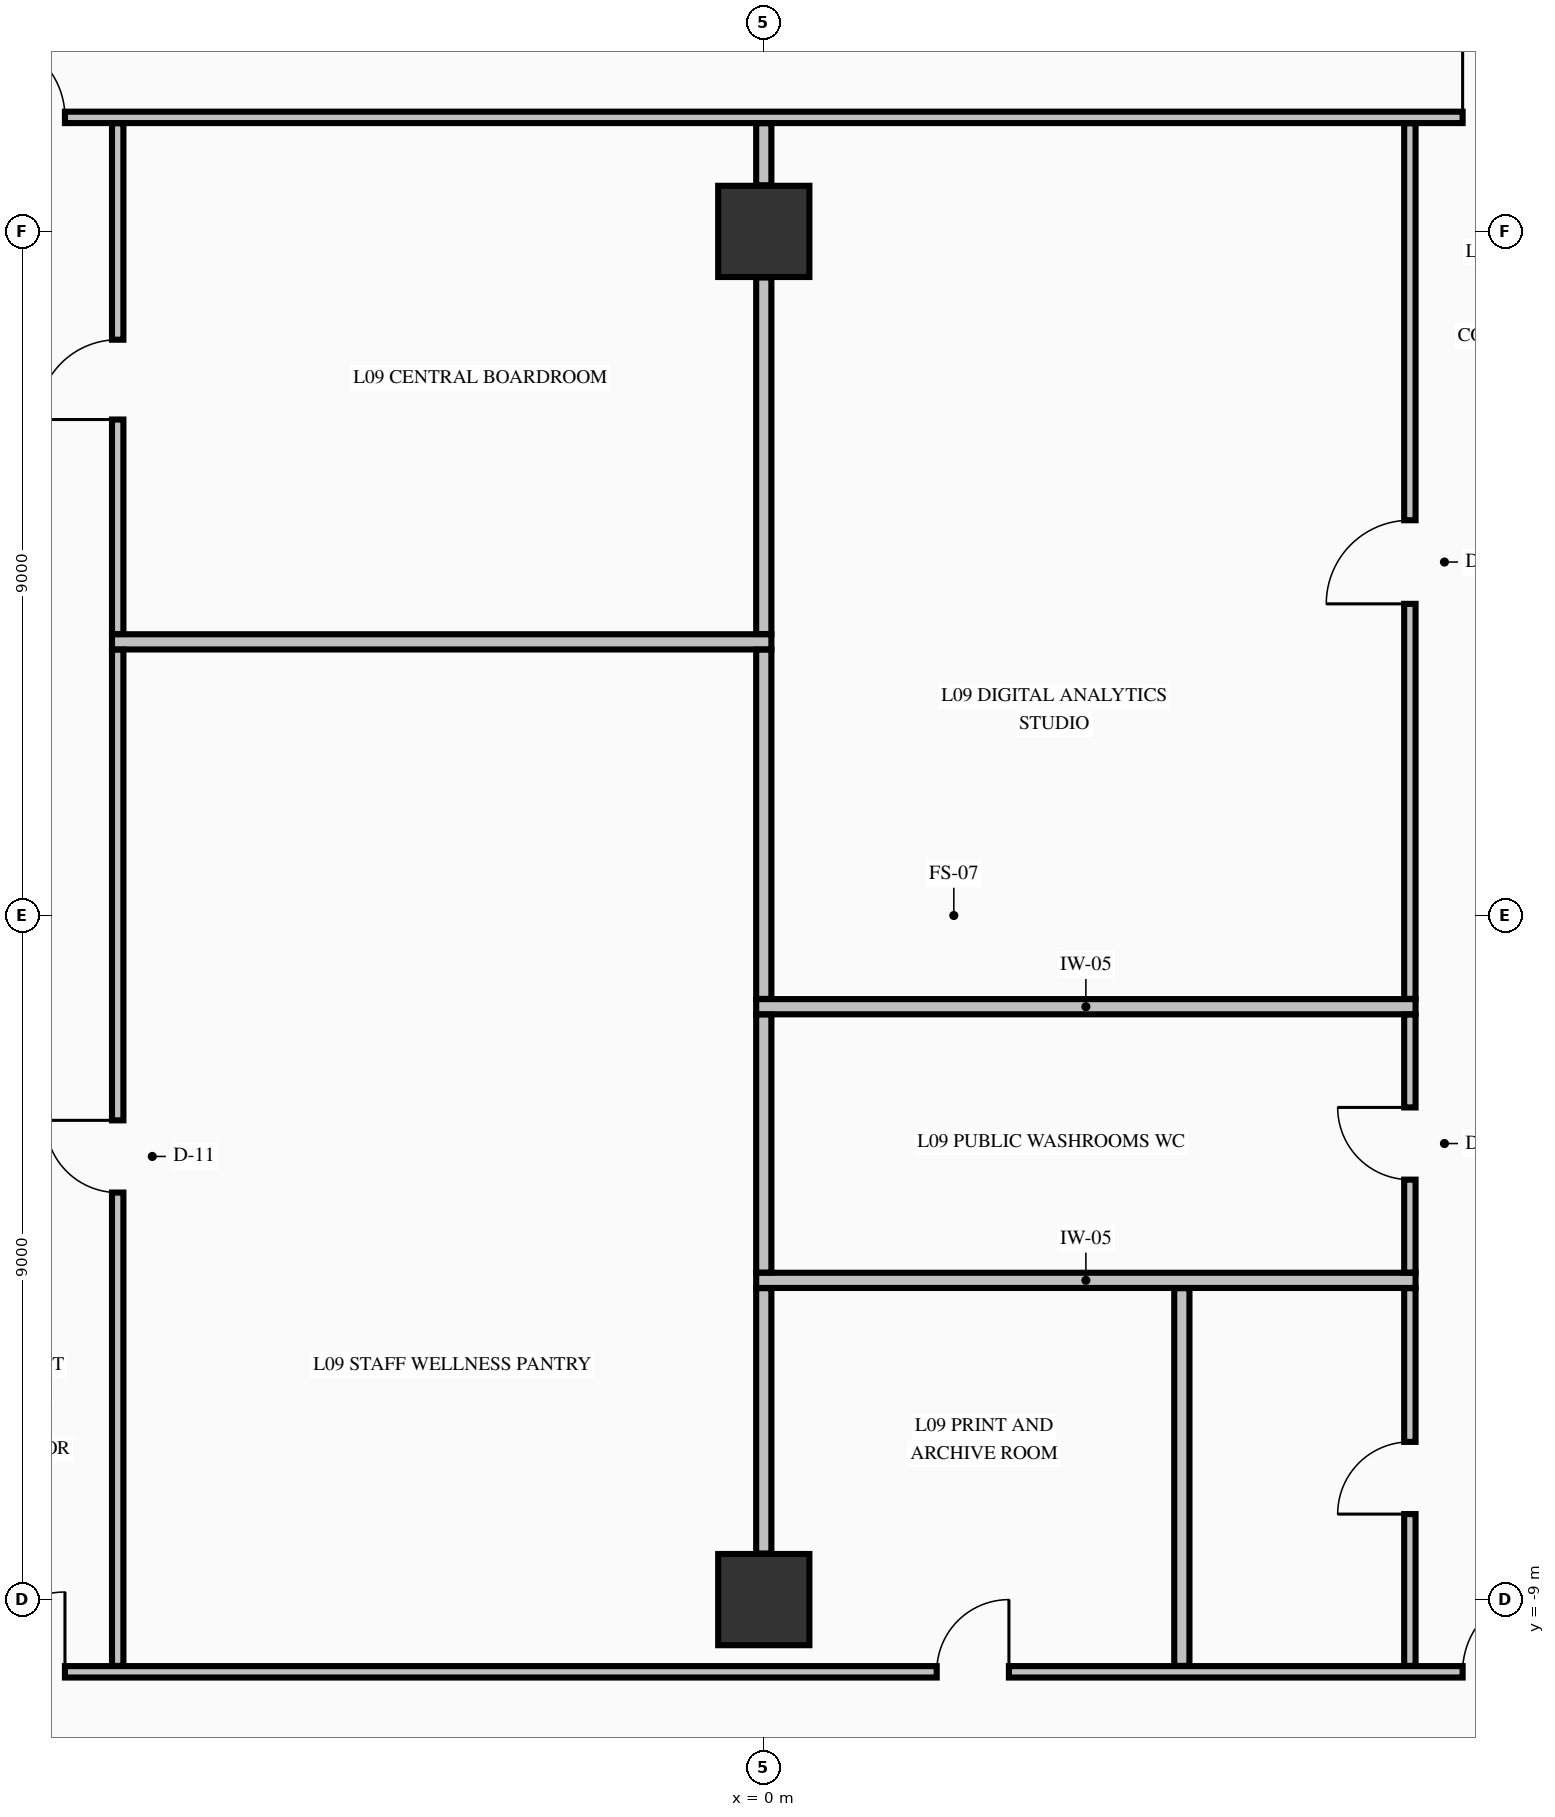
"""IFC4 building model, lengths in metres.
Left out: names, types, materials, properties, quantities, classifications, styles, units other than length and angle.
Written with IfcOpenShell. Run it as: python <this file> out.ifc"""

import sys

from ifc_helpers import new_model, si_unit, direction, frame, frame_2d, origin, origin_2d, place, context, subcontext, project, spatial, rectangle, extrude, element, fill, save


model = new_model("IFC4")
c1 = context("Model", 3, precision=1e-05, world=origin(), true_north=direction((0.0, 1.0)))
c2 = subcontext(c1, "Body", "Model", "MODEL_VIEW")
j1 = project(units=[si_unit("LENGTHUNIT", "METRE"), si_unit("PLANEANGLEUNIT", "RADIAN")], contexts=[c1])
p1 = place(None, origin())
s1 = spatial("IfcSite", under=j1, at=p1, CompositionType="ELEMENT")
p2 = place(p1, origin())
s2 = spatial("IfcBuilding", under=s1, at=p2, CompositionType="ELEMENT")
p3 = place(p2, frame((0.0, 0.0, 41.48)))
s3 = spatial("IfcBuildingStorey", under=s2, at=p3, CompositionType="ELEMENT", Elevation=41.48)
for number, where, z_axis, x_axis in (
    (1, (0.0, -9.0, -0.25), (0.0, 0.0, 1.0), (1.0, 0.0, 0.0)),
    (2, (0.0, 9.0, -0.25), (0.0, 0.0, 1.0), (1.0, 0.0, 0.0)),
):
    element("IfcColumn", number, at=place(p3, frame(where, z_axis=z_axis, x_axis=x_axis)), inside=s3, PredefinedType="COLUMN", context=c2, shape_type="SweptSolid", body=[
        extrude(rectangle(XDim=1.2, YDim=1.2, at=origin_2d()), origin(), (0.0, 0.0, 1.0), 3.57),
    ])
p4 = place(p3, frame((-10.394, -9.95, 0.0), z_axis=(0.0, 0.0, 1.0), x_axis=(1.0, 0.0, 0.0)))
e3 = element("IfcWall", 3, at=p4, inside=s3, PredefinedType="PARTITIONING", context=c2, shape_type="SweptSolid", body=[
    extrude(rectangle(XDim=20.788, YDim=0.15, at=frame_2d((10.394, 0.0))), origin(), (0.0, 0.0, 1.0), 3.32),
])
p5 = place(p4, frame((0.15, 0.0, 0.0)))
e4 = element("IfcOpeningElement", 4, at=p5, cuts=e3, PredefinedType="OPENING", context=c2, shape_type="SweptSolid", body=[
    extrude(rectangle(XDim=1.05, YDim=2.15, at=frame_2d((0.525, 1.075))), frame((0.0, 0.085, 0.0), z_axis=(0.0, -1.0, 0.0), x_axis=(1.0, 0.0, 0.0)), (0.0, 0.0, 1.0), 0.17),
])
p6 = place(p4, frame((19.588, 0.0, 0.0)))
e5 = element("IfcOpeningElement", 5, at=p6, cuts=e3, PredefinedType="OPENING", context=c2, shape_type="SweptSolid", body=[
    extrude(rectangle(XDim=1.05, YDim=2.15, at=frame_2d((0.525, 1.075))), frame((0.0, 0.085, 0.0), z_axis=(0.0, -1.0, 0.0), x_axis=(1.0, 0.0, 0.0)), (0.0, 0.0, 1.0), 0.17),
])
p7 = place(p4, frame((12.669, 0.0, 0.0)))
e6 = element("IfcOpeningElement", 6, at=p7, cuts=e3, PredefinedType="OPENING", context=c2, shape_type="SweptSolid", body=[
    extrude(rectangle(XDim=0.95, YDim=2.15, at=frame_2d((0.475, 1.075))), frame((0.0, 0.085, 0.0), z_axis=(0.0, -1.0, 0.0), x_axis=(1.0, 0.0, 0.0)), (0.0, 0.0, 1.0), 0.17),
])
for number, where, z_axis, x_axis in (
    (7, (-0.1, -4.8, 0.0), (0.0, 0.0, 1.0), (1.0, 0.0, 0.0)),
    (8, (-0.1, -1.2, 0.0), (0.0, 0.0, 1.0), (1.0, 0.0, 0.0)),
    (9, (-8.575, 3.6, 0.0), (0.0, 0.0, 1.0), (1.0, 0.0, 0.0)),
):
    element("IfcWall", number, at=place(p3, frame(where, z_axis=z_axis, x_axis=x_axis)), inside=s3, PredefinedType="PARTITIONING", context=c2, shape_type="SweptSolid", body=[
        extrude(rectangle(XDim=8.675, YDim=0.2, at=frame_2d((4.337, 0.0))), origin(), (0.0, 0.0, 1.0), 3.32),
    ])
p8 = place(p3, frame((-10.394, 10.5, 0.0), z_axis=(0.0, 0.0, 1.0), x_axis=(1.0, 0.0, 0.0)))
e10 = element("IfcWall", 10, at=p8, inside=s3, PredefinedType="PARTITIONING", context=c2, shape_type="SweptSolid", body=[
    extrude(rectangle(XDim=20.788, YDim=0.15, at=frame_2d((10.394, 0.0))), origin(), (0.0, 0.0, 1.0), 3.32),
])
p9 = place(p8, frame((0.15, 0.0, 0.0)))
e11 = element("IfcOpeningElement", 11, at=p9, cuts=e10, PredefinedType="OPENING", context=c2, shape_type="SweptSolid", body=[
    extrude(rectangle(XDim=1.05, YDim=2.15, at=frame_2d((0.525, 1.075))), frame((0.0, 0.085, 0.0), z_axis=(0.0, -1.0, 0.0), x_axis=(1.0, 0.0, 0.0)), (0.0, 0.0, 1.0), 0.17),
])
p10 = place(p8, frame((19.588, 0.0, 0.0)))
e12 = element("IfcOpeningElement", 12, at=p10, cuts=e10, PredefinedType="OPENING", context=c2, shape_type="SweptSolid", body=[
    extrude(rectangle(XDim=1.05, YDim=2.15, at=frame_2d((0.525, 1.075))), frame((0.0, 0.085, 0.0), z_axis=(0.0, -1.0, 0.0), x_axis=(1.0, 0.0, 0.0)), (0.0, 0.0, 1.0), 0.17),
])
p11 = place(p3, frame((-8.5, -9.872, 0.0), z_axis=(0.0, 0.0, 1.0), x_axis=(0.0, 1.0, 0.0)))
e13 = element("IfcWall", 13, at=p11, inside=s3, PredefinedType="PARTITIONING", context=c2, shape_type="SweptSolid", body=[
    extrude(rectangle(XDim=13.369, YDim=0.15, at=frame_2d((6.685, 0.0))), origin(), (0.0, 0.0, 1.0), 3.32),
])
p12 = place(p11, frame((6.227, 0.0, 0.0)))
e14 = element("IfcOpeningElement", 14, at=p12, cuts=e13, PredefinedType="OPENING", context=c2, shape_type="SweptSolid", body=[
    extrude(rectangle(XDim=0.95, YDim=2.15, at=frame_2d((0.475, 1.075))), frame((0.0, 0.085, 0.0), z_axis=(0.0, -1.0, 0.0), x_axis=(1.0, 0.0, 0.0)), (0.0, 0.0, 1.0), 0.17),
])
p13 = place(p3, frame((-8.5, 3.703, 0.0), z_axis=(0.0, 0.0, 1.0), x_axis=(0.0, 1.0, 0.0)))
e15 = element("IfcWall", 15, at=p13, inside=s3, PredefinedType="PARTITIONING", context=c2, shape_type="SweptSolid", body=[
    extrude(rectangle(XDim=6.719, YDim=0.15, at=frame_2d((3.36, 0.0))), origin(), (0.0, 0.0, 1.0), 3.32),
])
p14 = place(p13, frame((2.822, 0.0, 0.0)))
e16 = element("IfcOpeningElement", 16, at=p14, cuts=e15, PredefinedType="OPENING", context=c2, shape_type="SweptSolid", body=[
    extrude(rectangle(XDim=1.05, YDim=2.15, at=frame_2d((0.525, 1.075))), frame((0.0, 0.085, 0.0), z_axis=(0.0, -1.0, 0.0), x_axis=(1.0, 0.0, 0.0)), (0.0, 0.0, 1.0), 0.17),
])
p15 = place(p3, frame((0.0, -8.394, 0.0), z_axis=(0.0, 0.0, 1.0), x_axis=(0.0, 1.0, 0.0)))
e17 = element("IfcWall", 17, at=p15, inside=s3, PredefinedType="PARTITIONING", context=c2, shape_type="SweptSolid", body=[
    extrude(rectangle(XDim=3.491, YDim=0.2, at=frame_2d((1.746, 0.0))), origin(), (0.0, 0.0, 1.0), 2.66),
])
p16 = place(p3, frame((0.0, -4.697, 0.0), z_axis=(0.0, 0.0, 1.0), x_axis=(0.0, 1.0, 0.0)))
e18 = element("IfcWall", 18, at=p16, inside=s3, PredefinedType="PARTITIONING", context=c2, shape_type="SweptSolid", body=[
    extrude(rectangle(XDim=3.394, YDim=0.2, at=frame_2d((1.697, 0.0))), origin(), (0.0, 0.0, 1.0), 2.66),
])
p17 = place(p3, frame((0.0, -1.097, 0.0), z_axis=(0.0, 0.0, 1.0), x_axis=(0.0, 1.0, 0.0)))
e19 = element("IfcWall", 19, at=p17, inside=s3, PredefinedType="PARTITIONING", context=c2, shape_type="SweptSolid", body=[
    extrude(rectangle(XDim=4.594, YDim=0.2, at=frame_2d((2.297, 0.0))), origin(), (0.0, 0.0, 1.0), 2.66),
])
p18 = place(p3, frame((0.0, 3.703, 0.0), z_axis=(0.0, 0.0, 1.0), x_axis=(0.0, 1.0, 0.0)))
e20 = element("IfcWall", 20, at=p18, inside=s3, PredefinedType="PARTITIONING", context=c2, shape_type="SweptSolid", body=[
    extrude(rectangle(XDim=4.691, YDim=0.2, at=frame_2d((2.346, 0.0))), origin(), (0.0, 0.0, 1.0), 2.66),
])
p19 = place(p3, frame((0.0, 9.606, 0.0), z_axis=(0.0, 0.0, 1.0), x_axis=(0.0, 1.0, 0.0)))
e21 = element("IfcWall", 21, at=p19, inside=s3, PredefinedType="PARTITIONING", context=c2, shape_type="SweptSolid", body=[
    extrude(rectangle(XDim=0.816, YDim=0.2, at=frame_2d((0.408, 0.0))), origin(), (0.0, 0.0, 1.0), 2.66),
])
p20 = place(p3, frame((5.5, -9.872, 0.0), z_axis=(0.0, 0.0, 1.0), x_axis=(0.0, 1.0, 0.0)))
e22 = element("IfcWall", 22, at=p20, inside=s3, PredefinedType="PARTITIONING", context=c2, shape_type="SweptSolid", body=[
    extrude(rectangle(XDim=4.969, YDim=0.2, at=frame_2d((2.484, 0.0))), origin(), (0.0, 0.0, 1.0), 3.32),
])
p21 = place(p3, frame((8.5, -9.872, 0.0), z_axis=(0.0, 0.0, 1.0), x_axis=(0.0, 1.0, 0.0)))
e23 = element("IfcWall", 23, at=p21, inside=s3, PredefinedType="PARTITIONING", context=c2, shape_type="SweptSolid", body=[
    extrude(rectangle(XDim=4.969, YDim=0.15, at=frame_2d((2.484, 0.0))), origin(), (0.0, 0.0, 1.0), 3.32),
])
p22 = place(p21, frame((1.997, 0.0, 0.0)))
e24 = element("IfcOpeningElement", 24, at=p22, cuts=e23, PredefinedType="OPENING", context=c2, shape_type="SweptSolid", body=[
    extrude(rectangle(XDim=0.95, YDim=2.15, at=frame_2d((0.475, 1.075))), frame((0.0, 0.085, 0.0), z_axis=(0.0, -1.0, 0.0), x_axis=(1.0, 0.0, 0.0)), (0.0, 0.0, 1.0), 0.17),
])
p23 = place(p3, frame((8.5, -4.697, 0.0), z_axis=(0.0, 0.0, 1.0), x_axis=(0.0, 1.0, 0.0)))
e25 = element("IfcWall", 25, at=p23, inside=s3, PredefinedType="PARTITIONING", context=c2, shape_type="SweptSolid", body=[
    extrude(rectangle(XDim=3.394, YDim=0.15, at=frame_2d((1.697, 0.0))), origin(), (0.0, 0.0, 1.0), 3.32),
])
p24 = place(p23, frame((1.222, 0.0, 0.0)))
e26 = element("IfcOpeningElement", 26, at=p24, cuts=e25, PredefinedType="OPENING", context=c2, shape_type="SweptSolid", body=[
    extrude(rectangle(XDim=0.95, YDim=2.15, at=frame_2d((0.475, 1.075))), frame((0.0, 0.085, 0.0), z_axis=(0.0, -1.0, 0.0), x_axis=(1.0, 0.0, 0.0)), (0.0, 0.0, 1.0), 0.17),
])
p25 = place(p3, frame((8.5, -1.097, 0.0), z_axis=(0.0, 0.0, 1.0), x_axis=(0.0, 1.0, 0.0)))
e27 = element("IfcWall", 27, at=p25, inside=s3, PredefinedType="PARTITIONING", context=c2, shape_type="SweptSolid", body=[
    extrude(rectangle(XDim=11.519, YDim=0.15, at=frame_2d((5.76, 0.0))), origin(), (0.0, 0.0, 1.0), 3.32),
])
p26 = place(p25, frame((5.197, 0.0, 0.0)))
e28 = element("IfcOpeningElement", 28, at=p26, cuts=e27, PredefinedType="OPENING", context=c2, shape_type="SweptSolid", body=[
    extrude(rectangle(XDim=1.1, YDim=2.15, at=frame_2d((0.55, 1.075))), frame((0.0, 0.085, 0.0), z_axis=(0.0, -1.0, 0.0), x_axis=(1.0, 0.0, 0.0)), (0.0, 0.0, 1.0), 0.17),
])
p27 = place(p9, origin())
e29 = element("IfcDoor", 29, at=p27, inside=s3, OperationType="SINGLE_SWING_LEFT", PredefinedType="DOOR", context=c2, shape_type="SweptSolid", body=[
    extrude(rectangle(XDim=1.05, YDim=2.15, at=frame_2d((0.525, 1.075))), frame((0.0, 0.025, 0.0), z_axis=(0.0, -1.0, 0.0), x_axis=(1.0, 0.0, 0.0)), (0.0, 0.0, 1.0), 0.05),
])
fill(e11, e29)
p28 = place(p5, origin())
e30 = element("IfcDoor", 30, at=p28, inside=s3, OperationType="SINGLE_SWING_RIGHT", PredefinedType="DOOR", context=c2, shape_type="SweptSolid", body=[
    extrude(rectangle(XDim=1.05, YDim=2.15, at=frame_2d((0.525, 1.075))), frame((0.0, 0.025, 0.0), z_axis=(0.0, -1.0, 0.0), x_axis=(1.0, 0.0, 0.0)), (0.0, 0.0, 1.0), 0.05),
])
fill(e4, e30)
p29 = place(p10, origin())
e31 = element("IfcDoor", 31, at=p29, inside=s3, OperationType="SINGLE_SWING_LEFT", PredefinedType="DOOR", context=c2, shape_type="SweptSolid", body=[
    extrude(rectangle(XDim=1.05, YDim=2.15, at=frame_2d((0.525, 1.075))), frame((0.0, 0.025, 0.0), z_axis=(0.0, -1.0, 0.0), x_axis=(1.0, 0.0, 0.0)), (0.0, 0.0, 1.0), 0.05),
])
fill(e12, e31)
p30 = place(p6, origin())
e32 = element("IfcDoor", 32, at=p30, inside=s3, OperationType="SINGLE_SWING_RIGHT", PredefinedType="DOOR", context=c2, shape_type="SweptSolid", body=[
    extrude(rectangle(XDim=1.05, YDim=2.15, at=frame_2d((0.525, 1.075))), frame((0.0, 0.025, 0.0), z_axis=(0.0, -1.0, 0.0), x_axis=(1.0, 0.0, 0.0)), (0.0, 0.0, 1.0), 0.05),
])
fill(e5, e32)
p31 = place(p14, origin())
e33 = element("IfcDoor", 33, at=p31, inside=s3, OperationType="SINGLE_SWING_LEFT", PredefinedType="DOOR", context=c2, shape_type="SweptSolid", body=[
    extrude(rectangle(XDim=1.05, YDim=2.15, at=frame_2d((0.525, 1.075))), frame((0.0, 0.025, 0.0), z_axis=(0.0, -1.0, 0.0), x_axis=(1.0, 0.0, 0.0)), (0.0, 0.0, 1.0), 0.05),
])
fill(e16, e33)
p32 = place(p12, origin())
e34 = element("IfcDoor", 34, at=p32, inside=s3, OperationType="SINGLE_SWING_RIGHT", PredefinedType="DOOR", context=c2, shape_type="SweptSolid", body=[
    extrude(rectangle(XDim=0.95, YDim=2.15, at=frame_2d((0.475, 1.075))), frame((0.0, 0.025, 0.0), z_axis=(0.0, -1.0, 0.0), x_axis=(1.0, 0.0, 0.0)), (0.0, 0.0, 1.0), 0.05),
])
fill(e14, e34)
p33 = place(p26, origin())
e35 = element("IfcDoor", 35, at=p33, inside=s3, OperationType="SINGLE_SWING_LEFT", PredefinedType="DOOR", context=c2, shape_type="SweptSolid", body=[
    extrude(rectangle(XDim=1.1, YDim=2.15, at=frame_2d((0.55, 1.075))), frame((0.0, 0.025, 0.0), z_axis=(0.0, -1.0, 0.0), x_axis=(1.0, 0.0, 0.0)), (0.0, 0.0, 1.0), 0.05),
])
fill(e28, e35)
p34 = place(p24, origin())
e36 = element("IfcDoor", 36, at=p34, inside=s3, OperationType="SINGLE_SWING_RIGHT", PredefinedType="DOOR", context=c2, shape_type="SweptSolid", body=[
    extrude(rectangle(XDim=0.95, YDim=2.15, at=frame_2d((0.475, 1.075))), frame((0.0, 0.025, 0.0), z_axis=(0.0, -1.0, 0.0), x_axis=(1.0, 0.0, 0.0)), (0.0, 0.0, 1.0), 0.05),
])
fill(e26, e36)
p35 = place(p22, origin())
e37 = element("IfcDoor", 37, at=p35, inside=s3, OperationType="SINGLE_SWING_LEFT", PredefinedType="DOOR", context=c2, shape_type="SweptSolid", body=[
    extrude(rectangle(XDim=0.95, YDim=2.15, at=frame_2d((0.475, 1.075))), frame((0.0, 0.025, 0.0), z_axis=(0.0, -1.0, 0.0), x_axis=(1.0, 0.0, 0.0)), (0.0, 0.0, 1.0), 0.05),
])
fill(e24, e37)
p36 = place(p7, origin())
e38 = element("IfcDoor", 38, at=p36, inside=s3, OperationType="SINGLE_SWING_RIGHT", PredefinedType="DOOR", context=c2, shape_type="SweptSolid", body=[
    extrude(rectangle(XDim=0.95, YDim=2.15, at=frame_2d((0.475, 1.075))), frame((0.0, 0.025, 0.0), z_axis=(0.0, -1.0, 0.0), x_axis=(1.0, 0.0, 0.0)), (0.0, 0.0, 1.0), 0.05),
])
fill(e6, e38)
save(model, sys.argv[1])
